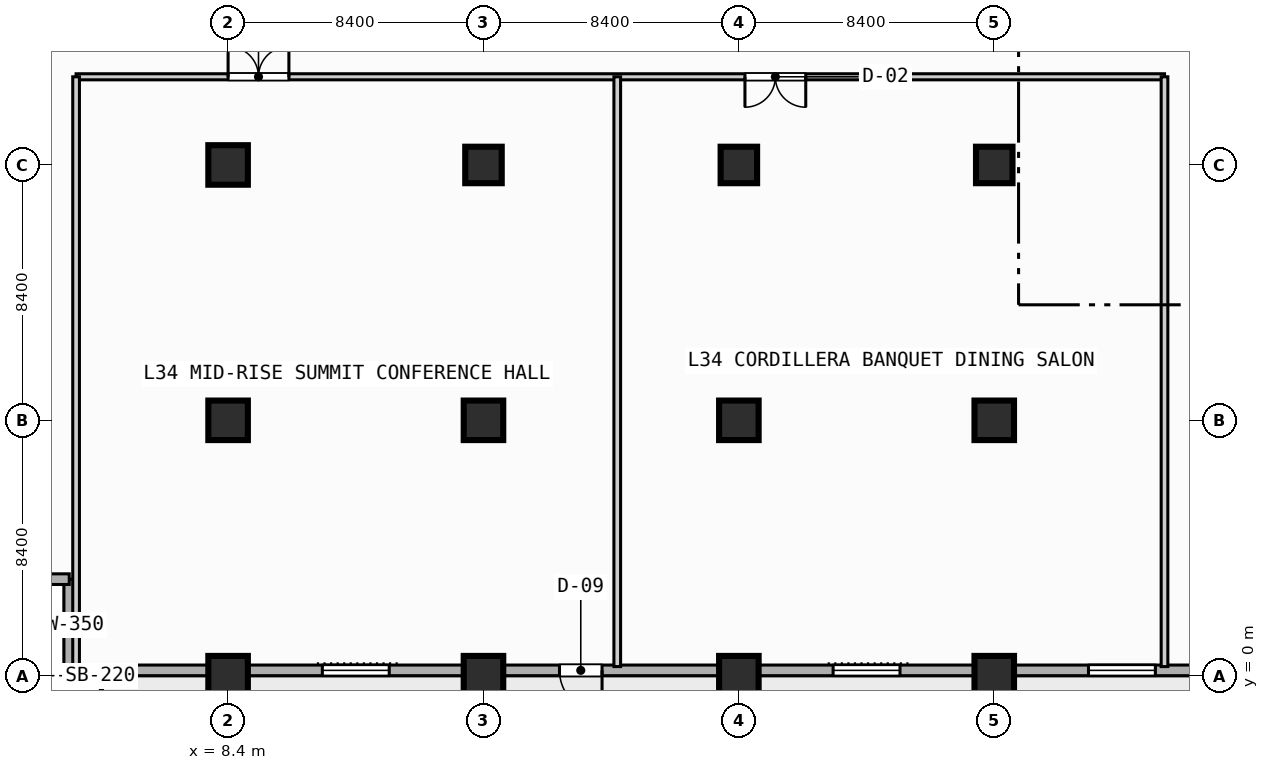
"""IFC4 building model, lengths in metres.
Left out: names, types, materials, properties, quantities, classifications, styles, units other than length and angle.
Written with IfcOpenShell. Run it as: python <this file> out.ifc"""

import sys

from ifc_helpers import new_model, si_unit, direction, frame, frame_2d, origin, origin_2d, place, context, subcontext, project, spatial, rectangle, extrude, element, fill, save


model = new_model("IFC4")
c1 = context("Model", 3, precision=1e-05, world=origin(), true_north=direction((0.0, 1.0)))
c2 = subcontext(c1, "Body", "Model", "MODEL_VIEW")
j1 = project(units=[si_unit("LENGTHUNIT", "METRE"), si_unit("PLANEANGLEUNIT", "RADIAN")], contexts=[c1])
p1 = place(None, origin())
s1 = spatial("IfcSite", under=j1, at=p1, CompositionType="ELEMENT")
p2 = place(p1, origin())
s2 = spatial("IfcBuilding", under=s1, at=p2, CompositionType="ELEMENT")
p3 = place(p2, frame((0.0, 0.0, 141.8)))
s3 = spatial("IfcBuildingStorey", under=s2, at=p3, CompositionType="ELEMENT", Elevation=141.8)
for number, where, z_axis, x_axis in (
    (1, (8.4, 0.0, 0.0), (0.0, 0.0, 1.0), (1.0, 0.0, 0.0)),
    (2, (8.4, 8.4, 0.0), (0.0, 0.0, 1.0), (1.0, 0.0, 0.0)),
    (3, (8.4, 16.8, 0.0), (0.0, 0.0, 1.0), (1.0, 0.0, 0.0)),
    (4, (16.8, 0.0, 0.0), (0.0, 0.0, 1.0), (1.0, 0.0, 0.0)),
    (5, (16.8, 8.4, 0.0), (0.0, 0.0, 1.0), (1.0, 0.0, 0.0)),
):
    element("IfcColumn", number, at=place(p3, frame(where, z_axis=z_axis, x_axis=x_axis)), inside=s3, PredefinedType="COLUMN", context=c2, shape_type="SweptSolid", body=[
        extrude(rectangle(XDim=1.3, YDim=1.3, at=origin_2d()), origin(), (0.0, 0.0, 1.0), 3.8),
    ])
p4 = place(p3, frame((16.8, 16.8, 0.0), z_axis=(0.0, 0.0, 1.0), x_axis=(1.0, 0.0, 0.0)))
e6 = element("IfcColumn", 6, at=p4, inside=s3, PredefinedType="COLUMN", context=c2, shape_type="SweptSolid", body=[
    extrude(rectangle(XDim=1.2, YDim=1.2, at=origin_2d()), origin(), (0.0, 0.0, 1.0), 3.8),
])
for number, where, z_axis, x_axis in (
    (7, (25.2, 0.0, 0.0), (0.0, 0.0, 1.0), (1.0, 0.0, 0.0)),
    (8, (25.2, 8.4, 0.0), (0.0, 0.0, 1.0), (1.0, 0.0, 0.0)),
):
    element("IfcColumn", number, at=place(p3, frame(where, z_axis=z_axis, x_axis=x_axis)), inside=s3, PredefinedType="COLUMN", context=c2, shape_type="SweptSolid", body=[
        extrude(rectangle(XDim=1.3, YDim=1.3, at=origin_2d()), origin(), (0.0, 0.0, 1.0), 3.8),
    ])
p5 = place(p3, frame((25.2, 16.8, 0.0), z_axis=(0.0, 0.0, 1.0), x_axis=(1.0, 0.0, 0.0)))
e9 = element("IfcColumn", 9, at=p5, inside=s3, PredefinedType="COLUMN", context=c2, shape_type="SweptSolid", body=[
    extrude(rectangle(XDim=1.2, YDim=1.2, at=origin_2d()), origin(), (0.0, 0.0, 1.0), 3.8),
])
for number, where, z_axis, x_axis in (
    (10, (33.6, 0.0, 0.0), (0.0, 0.0, 1.0), (1.0, 0.0, 0.0)),
    (11, (33.6, 8.4, 0.0), (0.0, 0.0, 1.0), (1.0, 0.0, 0.0)),
):
    element("IfcColumn", number, at=place(p3, frame(where, z_axis=z_axis, x_axis=x_axis)), inside=s3, PredefinedType="COLUMN", context=c2, shape_type="SweptSolid", body=[
        extrude(rectangle(XDim=1.3, YDim=1.3, at=origin_2d()), origin(), (0.0, 0.0, 1.0), 3.8),
    ])
p6 = place(p3, frame((33.6, 16.8, 0.0), z_axis=(0.0, 0.0, 1.0), x_axis=(1.0, 0.0, 0.0)))
e12 = element("IfcColumn", 12, at=p6, inside=s3, PredefinedType="COLUMN", context=c2, shape_type="SweptSolid", body=[
    extrude(rectangle(XDim=1.2, YDim=1.2, at=origin_2d()), origin(), (0.0, 0.0, 1.0), 3.8),
])
for number, where, z_axis, x_axis in (
    (13, (3.175, 0.175, 0.0), (0.0, 0.0, 1.0), (0.0, 1.0, 0.0)),
    (14, (3.175, 3.175, 0.0), (0.0, 0.0, 1.0), (-1.0, 0.0, 0.0)),
):
    element("IfcWall", number, at=place(p3, frame(where, z_axis=z_axis, x_axis=x_axis)), inside=s3, PredefinedType="STANDARD", context=c2, shape_type="SweptSolid", body=[
        extrude(rectangle(XDim=3.0, YDim=0.35, at=frame_2d((1.5, 0.0))), origin(), (0.0, 0.0, 1.0), 3.55),
    ])
p7 = place(p3, frame((72.425, 0.175, 0.0), z_axis=(0.0, 0.0, 1.0), x_axis=(-1.0, 0.0, 0.0)))
e15 = element("IfcWall", 15, at=p7, inside=s3, PredefinedType="STANDARD", context=c2, shape_type="SweptSolid", body=[
    extrude(rectangle(XDim=69.25, YDim=0.35, at=frame_2d((34.625, 0.0))), origin(), (0.0, 0.0, 1.0), 3.55),
])
p8 = place(p7, frame((51.725, 0.0, 0.0)))
e16 = element("IfcOpeningElement", 16, at=p8, cuts=e15, PredefinedType="OPENING", context=c2, shape_type="SweptSolid", body=[
    extrude(rectangle(XDim=1.4, YDim=2.2, at=frame_2d((0.7, 1.1))), frame((0.0, 0.185, 0.0), z_axis=(0.0, -1.0, 0.0), x_axis=(1.0, 0.0, 0.0)), (0.0, 0.0, 1.0), 0.37),
])
p9 = place(p7, frame((58.725, 0.0, 0.85)))
e17 = element("IfcOpeningElement", 17, at=p9, cuts=e15, PredefinedType="OPENING", context=c2, shape_type="SweptSolid", body=[
    extrude(rectangle(XDim=2.2, YDim=1.8, at=frame_2d((1.1, 0.9))), frame((0.0, 0.185, 0.0), z_axis=(0.0, -1.0, 0.0), x_axis=(1.0, 0.0, 0.0)), (0.0, 0.0, 1.0), 0.37),
])
p10 = place(p7, frame((41.925, 0.0, 0.85)))
e18 = element("IfcOpeningElement", 18, at=p10, cuts=e15, PredefinedType="OPENING", context=c2, shape_type="SweptSolid", body=[
    extrude(rectangle(XDim=2.2, YDim=1.8, at=frame_2d((1.1, 0.9))), frame((0.0, 0.185, 0.0), z_axis=(0.0, -1.0, 0.0), x_axis=(1.0, 0.0, 0.0)), (0.0, 0.0, 1.0), 0.37),
])
p11 = place(p7, frame((33.525, 0.0, 0.85)))
e19 = element("IfcOpeningElement", 19, at=p11, cuts=e15, PredefinedType="OPENING", context=c2, shape_type="SweptSolid", body=[
    extrude(rectangle(XDim=2.2, YDim=1.8, at=frame_2d((1.1, 0.9))), frame((0.0, 0.185, 0.0), z_axis=(0.0, -1.0, 0.0), x_axis=(1.0, 0.0, 0.0)), (0.0, 0.0, 1.0), 0.37),
])
p12 = place(p7, frame((25.125, 0.0, 0.85)))
e20 = element("IfcOpeningElement", 20, at=p12, cuts=e15, PredefinedType="OPENING", context=c2, shape_type="SweptSolid", body=[
    extrude(rectangle(XDim=2.2, YDim=1.8, at=frame_2d((1.1, 0.9))), frame((0.0, 0.185, 0.0), z_axis=(0.0, -1.0, 0.0), x_axis=(1.0, 0.0, 0.0)), (0.0, 0.0, 1.0), 0.37),
])
p13 = place(p3, frame((3.4, 19.7, 0.0), z_axis=(0.0, 0.0, 1.0), x_axis=(1.0, 0.0, 0.0)))
e21 = element("IfcWall", 21, at=p13, inside=s3, PredefinedType="PARTITIONING", context=c2, shape_type="SweptSolid", body=[
    extrude(rectangle(XDim=35.8, YDim=0.2, at=frame_2d((17.9, 0.0))), origin(), (0.0, 0.0, 1.0), 3.55),
])
p14 = place(p13, frame((5.0, 0.0, 0.0)))
e22 = element("IfcOpeningElement", 22, at=p14, cuts=e21, PredefinedType="OPENING", context=c2, shape_type="SweptSolid", body=[
    extrude(rectangle(XDim=2.0, YDim=2.15, at=frame_2d((1.0, 1.075))), frame((0.0, 0.11, 0.0), z_axis=(0.0, -1.0, 0.0), x_axis=(1.0, 0.0, 0.0)), (0.0, 0.0, 1.0), 0.22),
])
p15 = place(p13, frame((22.0, 0.0, 0.0)))
e23 = element("IfcOpeningElement", 23, at=p15, cuts=e21, PredefinedType="OPENING", context=c2, shape_type="SweptSolid", body=[
    extrude(rectangle(XDim=2.0, YDim=2.15, at=frame_2d((1.0, 1.075))), frame((0.0, 0.11, 0.0), z_axis=(0.0, -1.0, 0.0), x_axis=(1.0, 0.0, 0.0)), (0.0, 0.0, 1.0), 0.22),
])
for number, where, z_axis, x_axis in (
    (24, (3.4, 0.3, 0.0), (0.0, 0.0, 1.0), (0.0, 1.0, 0.0)),
    (25, (21.2, 0.3, 0.0), (0.0, 0.0, 1.0), (0.0, 1.0, 0.0)),
    (26, (39.2, 0.3, 0.0), (0.0, 0.0, 1.0), (0.0, 1.0, 0.0)),
):
    element("IfcWall", number, at=place(p3, frame(where, z_axis=z_axis, x_axis=x_axis)), inside=s3, PredefinedType="PARTITIONING", context=c2, shape_type="SweptSolid", body=[
        extrude(rectangle(XDim=19.4, YDim=0.22, at=frame_2d((9.7, 0.0))), origin(), (0.0, 0.0, 1.0), 3.55),
    ])
p16 = place(p8, origin())
e27 = element("IfcDoor", 27, at=p16, inside=s3, OperationType="SINGLE_SWING_LEFT", PredefinedType="DOOR", context=c2, shape_type="SweptSolid", body=[
    extrude(rectangle(XDim=1.4, YDim=2.2, at=frame_2d((0.7, 1.1))), frame((0.0, 0.025, 0.0), z_axis=(0.0, -1.0, 0.0), x_axis=(1.0, 0.0, 0.0)), (0.0, 0.0, 1.0), 0.05),
])
fill(e16, e27)
p17 = place(p9, origin())
e28 = element("IfcWindow", 28, at=p17, inside=s3, PartitioningType="SINGLE_PANEL", PredefinedType="WINDOW", context=c2, shape_type="SweptSolid", body=[
    extrude(rectangle(XDim=2.2, YDim=1.8, at=frame_2d((1.1, 0.9))), frame((0.0, 0.03, 0.0), z_axis=(0.0, -1.0, 0.0), x_axis=(1.0, 0.0, 0.0)), (0.0, 0.0, 1.0), 0.06),
])
fill(e17, e28)
p18 = place(p10, origin())
e29 = element("IfcWindow", 29, at=p18, inside=s3, PartitioningType="SINGLE_PANEL", PredefinedType="WINDOW", context=c2, shape_type="SweptSolid", body=[
    extrude(rectangle(XDim=2.2, YDim=1.8, at=frame_2d((1.1, 0.9))), frame((0.0, 0.03, 0.0), z_axis=(0.0, -1.0, 0.0), x_axis=(1.0, 0.0, 0.0)), (0.0, 0.0, 1.0), 0.06),
])
fill(e18, e29)
p19 = place(p11, origin())
e30 = element("IfcWindow", 30, at=p19, inside=s3, PartitioningType="SINGLE_PANEL", PredefinedType="WINDOW", context=c2, shape_type="SweptSolid", body=[
    extrude(rectangle(XDim=2.2, YDim=1.8, at=frame_2d((1.1, 0.9))), frame((0.0, 0.03, 0.0), z_axis=(0.0, -1.0, 0.0), x_axis=(1.0, 0.0, 0.0)), (0.0, 0.0, 1.0), 0.06),
])
fill(e19, e30)
p20 = place(p14, origin())
e31 = element("IfcDoor", 31, at=p20, inside=s3, OperationType="SINGLE_SWING_LEFT", PredefinedType="DOOR", context=c2, shape_type="SweptSolid", body=[
    extrude(rectangle(XDim=2.0, YDim=2.15, at=frame_2d((1.0, 1.075))), frame((0.0, 0.025, 0.0), z_axis=(0.0, -1.0, 0.0), x_axis=(1.0, 0.0, 0.0)), (0.0, 0.0, 1.0), 0.05),
])
fill(e22, e31)
p21 = place(p15, origin())
e32 = element("IfcDoor", 32, at=p21, inside=s3, OperationType="SINGLE_SWING_RIGHT", PredefinedType="DOOR", context=c2, shape_type="SweptSolid", body=[
    extrude(rectangle(XDim=2.0, YDim=2.15, at=frame_2d((1.0, 1.075))), frame((0.0, 0.025, 0.0), z_axis=(0.0, -1.0, 0.0), x_axis=(1.0, 0.0, 0.0)), (0.0, 0.0, 1.0), 0.05),
])
fill(e23, e32)
save(model, sys.argv[1])
